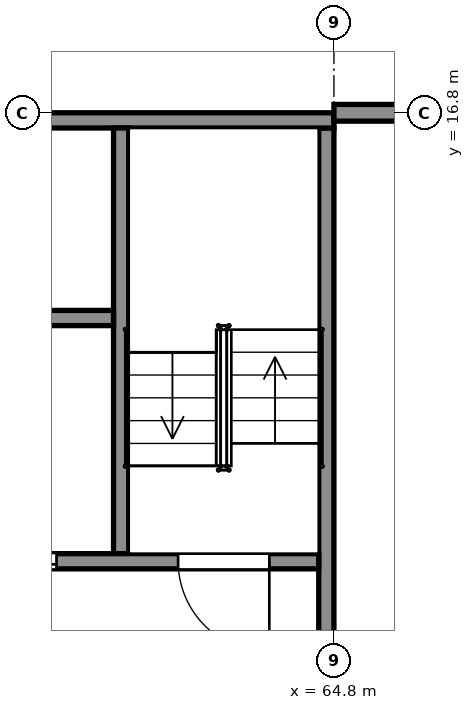
"""IFC4 building model, lengths in metres.
Left out: names, types, materials, properties, quantities, classifications, styles, units other than length and angle.
Written with IfcOpenShell. Run it as: python <this file> out.ifc"""

import sys

from ifc_helpers import new_model, si_unit, direction, frame, frame_2d, origin, place, context, subcontext, project, spatial, rectangle, extrude, element, fill, save


model = new_model("IFC4")
c1 = context("Model", 3, precision=1e-05, world=origin(), true_north=direction((0.0, 1.0)))
c2 = subcontext(c1, "Body", "Model", "MODEL_VIEW")
j1 = project(units=[si_unit("LENGTHUNIT", "METRE"), si_unit("PLANEANGLEUNIT", "RADIAN")], contexts=[c1])
p1 = place(None, origin())
s1 = spatial("IfcSite", under=j1, at=p1, CompositionType="ELEMENT")
p2 = place(p1, origin())
s2 = spatial("IfcBuilding", under=s1, at=p2, CompositionType="ELEMENT")
p3 = place(p2, frame((0.0, 0.0, 5.5)))
s3 = spatial("IfcBuildingStorey", under=s2, at=p3, CompositionType="ELEMENT", Elevation=5.5)
p4 = place(p3, frame((56.4, 16.7, 0.0), z_axis=(0.0, 0.0, 1.0), x_axis=(1.0, 0.0, 0.0)))
e1 = element("IfcWall", 1, at=p4, inside=s3, PredefinedType="SHEAR", context=c2, shape_type="SweptSolid", body=[
    extrude(rectangle(XDim=8.4, YDim=0.2, at=frame_2d((4.2, 0.0))), origin(), (0.0, 0.0, 1.0), 5.0),
])
p5 = place(p3, frame((64.7, 8.6, 0.0), z_axis=(0.0, 0.0, 1.0), x_axis=(0.0, 1.0, 0.0)))
e2 = element("IfcWall", 2, at=p5, inside=s3, PredefinedType="SHEAR", context=c2, shape_type="SweptSolid", body=[
    extrude(rectangle(XDim=8.0, YDim=0.2, at=frame_2d((4.0, 0.0))), origin(), (0.0, 0.0, 1.0), 5.0),
])
p6 = place(p3, frame((56.6, 10.9, 0.0), z_axis=(0.0, 0.0, 1.0), x_axis=(1.0, 0.0, 0.0)))
e3 = element("IfcWall", 3, at=p6, inside=s3, PredefinedType="SHEAR", context=c2, shape_type="SweptSolid", body=[
    extrude(rectangle(XDim=8.0, YDim=0.2, at=frame_2d((4.0, 0.0))), origin(), (0.0, 0.0, 1.0), 5.0),
])
p7 = place(p6, frame((0.65, 0.0, 0.0)))
e4 = element("IfcOpeningElement", 4, at=p7, cuts=e3, PredefinedType="OPENING", context=c2, shape_type="SweptSolid", body=[
    extrude(rectangle(XDim=1.2, YDim=2.1, at=frame_2d((0.6, 1.05))), frame((0.0, 0.11, 0.0), z_axis=(0.0, -1.0, 0.0), x_axis=(1.0, 0.0, 0.0)), (0.0, 0.0, 1.0), 0.22),
])
p8 = place(p6, frame((6.15, 0.0, 0.0)))
e5 = element("IfcOpeningElement", 5, at=p8, cuts=e3, PredefinedType="OPENING", context=c2, shape_type="SweptSolid", body=[
    extrude(rectangle(XDim=1.2, YDim=2.1, at=frame_2d((0.6, 1.05))), frame((0.0, 0.11, 0.0), z_axis=(0.0, -1.0, 0.0), x_axis=(1.0, 0.0, 0.0)), (0.0, 0.0, 1.0), 0.22),
])
p9 = place(p6, frame((3.45, 0.0, 0.0)))
e6 = element("IfcOpeningElement", 6, at=p9, cuts=e3, PredefinedType="OPENING", context=c2, shape_type="SweptSolid", body=[
    extrude(rectangle(XDim=1.1, YDim=2.1, at=frame_2d((0.55, 1.05))), frame((0.0, 0.11, 0.0), z_axis=(0.0, -1.0, 0.0), x_axis=(1.0, 0.0, 0.0)), (0.0, 0.0, 1.0), 0.22),
])
p10 = place(p3, frame((62.0, 11.0, 0.0), z_axis=(0.0, 0.0, 1.0), x_axis=(0.0, 1.0, 0.0)))
e7 = element("IfcWall", 7, at=p10, inside=s3, PredefinedType="SHEAR", context=c2, shape_type="SweptSolid", body=[
    extrude(rectangle(XDim=5.6, YDim=0.2, at=frame_2d((2.8, 0.0))), origin(), (0.0, 0.0, 1.0), 5.0),
])
p11 = place(p3, frame((59.3, 14.1, 0.0), z_axis=(0.0, 0.0, 1.0), x_axis=(1.0, 0.0, 0.0)))
e8 = element("IfcWall", 8, at=p11, inside=s3, PredefinedType="SHEAR", context=c2, shape_type="SweptSolid", body=[
    extrude(rectangle(XDim=2.6, YDim=0.2, at=frame_2d((1.3, 0.0))), origin(), (0.0, 0.0, 1.0), 5.0),
])
p12 = place(p3, frame((64.8, 16.8, 0.0), z_axis=(0.0, 0.0, 1.0), x_axis=(1.0, 0.0, 0.0)))
e9 = element("IfcWall", 9, at=p12, inside=s3, PredefinedType="SOLIDWALL", context=c2, shape_type="SweptSolid", body=[
    extrude(rectangle(XDim=8.0, YDim=0.22, at=frame_2d((4.0, 0.0))), origin(), (0.0, 0.0, 1.0), 3.94),
])
p13 = place(p12, frame((2.2, 0.0, 0.9)))
e10 = element("IfcOpeningElement", 10, at=p13, cuts=e9, PredefinedType="OPENING", context=c2, shape_type="SweptSolid", body=[
    extrude(rectangle(XDim=3.6, YDim=1.5, at=frame_2d((1.8, 0.75))), frame((0.0, 0.12, 0.0), z_axis=(0.0, -1.0, 0.0), x_axis=(1.0, 0.0, 0.0)), (0.0, 0.0, 1.0), 0.24),
])
p14 = place(p8, origin())
e11 = element("IfcDoor", 11, at=p14, inside=s3, OperationType="SINGLE_SWING_RIGHT", PredefinedType="DOOR", context=c2, shape_type="SweptSolid", body=[
    extrude(rectangle(XDim=1.2, YDim=2.1, at=frame_2d((0.6, 1.05))), frame((0.0, 0.025, 0.0), z_axis=(0.0, -1.0, 0.0), x_axis=(1.0, 0.0, 0.0)), (0.0, 0.0, 1.0), 0.05),
])
fill(e5, e11)
p15 = place(p9, origin())
e12 = element("IfcDoor", 12, at=p15, inside=s3, OperationType="DOUBLE_DOOR_SLIDING", PredefinedType="DOOR", context=c2, shape_type="SweptSolid", body=[
    extrude(rectangle(XDim=1.1, YDim=2.1, at=frame_2d((0.55, 1.05))), frame((0.0, 0.025, 0.0), z_axis=(0.0, -1.0, 0.0), x_axis=(1.0, 0.0, 0.0)), (0.0, 0.0, 1.0), 0.05),
])
fill(e6, e12)
save(model, sys.argv[1])
